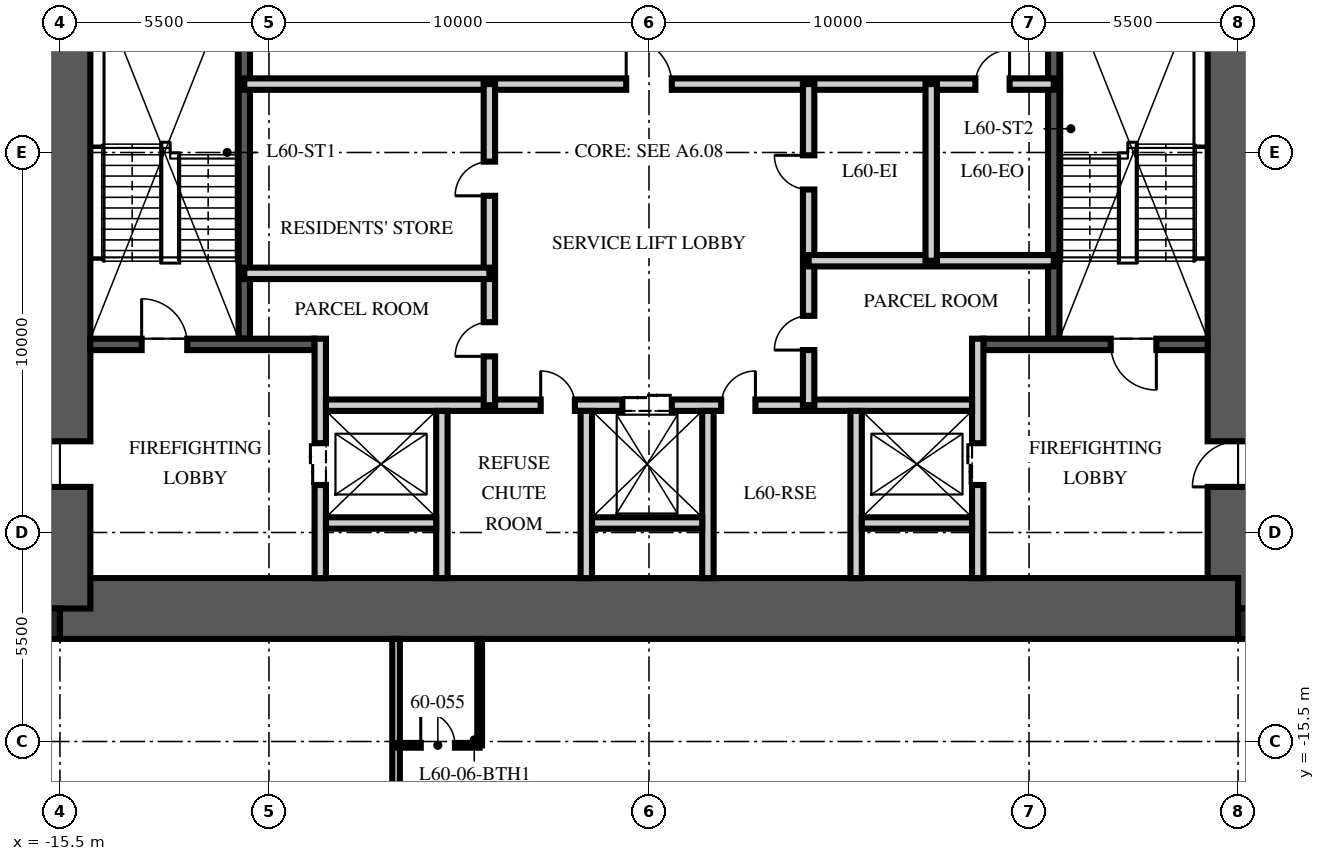
"""IFC4 building model, lengths in metres.
Left out: names, types, materials, properties, quantities, classifications, styles, units other than length and angle.
Written with IfcOpenShell. Run it as: python <this file> out.ifc"""

import sys

from ifc_helpers import new_model, si_unit, direction, frame, frame_2d, origin, origin_2d, place, context, subcontext, project, spatial, rectangle, extrude, element, fill, save


model = new_model("IFC4")
c1 = context("Model", 3, precision=1e-05, world=origin(), true_north=direction((0.0, 1.0)))
c2 = subcontext(c1, "Body", "Model", "MODEL_VIEW")
j1 = project(units=[si_unit("LENGTHUNIT", "METRE"), si_unit("PLANEANGLEUNIT", "RADIAN")], contexts=[c1])
p1 = place(None, origin())
s1 = spatial("IfcSite", under=j1, at=p1, CompositionType="ELEMENT")
p2 = place(p1, origin())
s2 = spatial("IfcBuilding", under=s1, at=p2, CompositionType="ELEMENT")
p3 = place(p2, frame((0.0, 0.0, 240.75)))
s3 = spatial("IfcBuildingStorey", under=s2, at=p3, CompositionType="ELEMENT", Elevation=240.75)
p4 = place(p3, frame((15.5, -12.0, -0.25), z_axis=(0.0, 0.0, 1.0), x_axis=(0.0, 1.0, 0.0)))
e1 = element("IfcWall", 1, at=p4, inside=s3, PredefinedType="SHEAR", context=c2, shape_type="SweptSolid", body=[
    extrude(rectangle(XDim=24.0, YDim=1.6, at=frame_2d((12.0, 0.0))), origin(), (0.0, 0.0, 1.0), 3.75),
])
p5 = place(p4, frame((3.2, 0.0, 0.25)))
e2 = element("IfcOpeningElement", 2, at=p5, cuts=e1, PredefinedType="OPENING", context=c2, shape_type="SweptSolid", body=[
    extrude(rectangle(XDim=1.2, YDim=2.1, at=frame_2d((0.6, 1.05))), frame((0.0, 0.81, 0.0), z_axis=(0.0, -1.0, 0.0), x_axis=(1.0, 0.0, 0.0)), (0.0, 0.0, 1.0), 1.62),
])
p6 = place(p4, frame((19.3, 0.0, 0.25)))
e3 = element("IfcOpeningElement", 3, at=p6, cuts=e1, PredefinedType="OPENING", context=c2, shape_type="SweptSolid", body=[
    extrude(rectangle(XDim=1.8, YDim=2.1, at=frame_2d((0.9, 1.05))), frame((0.0, 0.81, 0.0), z_axis=(0.0, -1.0, 0.0), x_axis=(1.0, 0.0, 0.0)), (0.0, 0.0, 1.0), 1.62),
])
p7 = place(p3, frame((-15.5, -12.0, -0.25), z_axis=(0.0, 0.0, 1.0), x_axis=(1.0, 0.0, 0.0)))
e4 = element("IfcWall", 4, at=p7, inside=s3, PredefinedType="SHEAR", context=c2, shape_type="SweptSolid", body=[
    extrude(rectangle(XDim=31.0, YDim=1.6, at=frame_2d((15.5, 0.0))), origin(), (0.0, 0.0, 1.0), 3.75),
])
p8 = place(p3, frame((-15.5, -12.0, -0.25), z_axis=(0.0, 0.0, 1.0), x_axis=(0.0, 1.0, 0.0)))
e5 = element("IfcWall", 5, at=p8, inside=s3, PredefinedType="SHEAR", context=c2, shape_type="SweptSolid", body=[
    extrude(rectangle(XDim=24.0, YDim=1.6, at=frame_2d((12.0, 0.0))), origin(), (0.0, 0.0, 1.0), 3.75),
])
p9 = place(p8, frame((3.2, 0.0, 0.25)))
e6 = element("IfcOpeningElement", 6, at=p9, cuts=e5, PredefinedType="OPENING", context=c2, shape_type="SweptSolid", body=[
    extrude(rectangle(XDim=1.2, YDim=2.1, at=frame_2d((0.6, 1.05))), frame((0.0, 0.81, 0.0), z_axis=(0.0, -1.0, 0.0), x_axis=(1.0, 0.0, 0.0)), (0.0, 0.0, 1.0), 1.62),
])
p10 = place(p8, frame((19.3, 0.0, 0.25)))
e7 = element("IfcOpeningElement", 7, at=p10, cuts=e5, PredefinedType="OPENING", context=c2, shape_type="SweptSolid", body=[
    extrude(rectangle(XDim=1.8, YDim=2.1, at=frame_2d((0.9, 1.05))), frame((0.0, 0.81, 0.0), z_axis=(0.0, -1.0, 0.0), x_axis=(1.0, 0.0, 0.0)), (0.0, 0.0, 1.0), 1.62),
])
for number, where, z_axis, x_axis in (
    (8, (-15.9, -12.4, -0.25), (0.0, 0.0, 1.0), (1.0, 0.0, 0.0)),
    (9, (15.9, -12.4, -0.25), (0.0, 0.0, 1.0), (1.0, 0.0, 0.0)),
):
    element("IfcColumn", number, at=place(p3, frame(where, z_axis=z_axis, x_axis=x_axis)), inside=s3, PredefinedType="COLUMN", context=c2, shape_type="SweptSolid", body=[
        extrude(rectangle(XDim=0.8, YDim=0.8, at=origin_2d()), origin(), (0.0, 0.0, 1.0), 3.75),
    ])
p11 = place(p3, frame((-10.65, -4.9, 0.0), z_axis=(0.0, 0.0, 1.0), x_axis=(0.0, 1.0, 0.0)))
e10 = element("IfcWall", 10, at=p11, inside=s3, PredefinedType="SOLIDWALL", context=c2, shape_type="SweptSolid", body=[
    extrude(rectangle(XDim=10.1, YDim=0.3, at=frame_2d((5.05, 0.0))), origin(), (0.0, 0.0, 1.0), 3.5),
])
p12 = place(p3, frame((-14.7, -5.05, 0.0), z_axis=(0.0, 0.0, 1.0), x_axis=(1.0, 0.0, 0.0)))
e11 = element("IfcWall", 11, at=p12, inside=s3, PredefinedType="SOLIDWALL", context=c2, shape_type="SweptSolid", body=[
    extrude(rectangle(XDim=5.9, YDim=0.3, at=frame_2d((2.95, 0.0))), origin(), (0.0, 0.0, 1.0), 3.5),
])
p13 = place(p12, frame((1.35, 0.0, 0.0)))
e12 = element("IfcOpeningElement", 12, at=p13, cuts=e11, PredefinedType="OPENING", context=c2, shape_type="SweptSolid", body=[
    extrude(rectangle(XDim=1.2, YDim=2.1, at=frame_2d((0.6, 1.05))), frame((0.0, 0.16, 0.0), z_axis=(0.0, -1.0, 0.0), x_axis=(1.0, 0.0, 0.0)), (0.0, 0.0, 1.0), 0.32),
])
p14 = place(p3, frame((-8.65, -11.2, 0.0), z_axis=(0.0, 0.0, 1.0), x_axis=(0.0, 1.0, 0.0)))
e13 = element("IfcWall", 13, at=p14, inside=s3, PredefinedType="PARTITIONING", context=c2, shape_type="SweptSolid", body=[
    extrude(rectangle(XDim=6.3, YDim=0.3, at=frame_2d((3.15, 0.0))), origin(), (0.0, 0.0, 1.0), 3.5),
])
p15 = place(p14, frame((2.45, 0.0, 0.0)))
e14 = element("IfcOpeningElement", 14, at=p15, cuts=e13, PredefinedType="OPENING", context=c2, shape_type="SweptSolid", body=[
    extrude(rectangle(XDim=1.1, YDim=2.1, at=frame_2d((0.55, 1.05))), frame((0.0, 0.16, 0.0), z_axis=(0.0, -1.0, 0.0), x_axis=(1.0, 0.0, 0.0)), (0.0, 0.0, 1.0), 0.32),
])
p16 = place(p3, frame((10.65, -4.9, 0.0), z_axis=(0.0, 0.0, 1.0), x_axis=(0.0, 1.0, 0.0)))
e15 = element("IfcWall", 15, at=p16, inside=s3, PredefinedType="SOLIDWALL", context=c2, shape_type="SweptSolid", body=[
    extrude(rectangle(XDim=10.1, YDim=0.3, at=frame_2d((5.05, 0.0))), origin(), (0.0, 0.0, 1.0), 3.5),
])
p17 = place(p3, frame((14.7, -5.05, 0.0), z_axis=(0.0, 0.0, 1.0), x_axis=(-1.0, 0.0, 0.0)))
e16 = element("IfcWall", 16, at=p17, inside=s3, PredefinedType="SOLIDWALL", context=c2, shape_type="SweptSolid", body=[
    extrude(rectangle(XDim=5.9, YDim=0.3, at=frame_2d((2.95, 0.0))), origin(), (0.0, 0.0, 1.0), 3.5),
])
p18 = place(p17, frame((1.35, 0.0, 0.0)))
e17 = element("IfcOpeningElement", 17, at=p18, cuts=e16, PredefinedType="OPENING", context=c2, shape_type="SweptSolid", body=[
    extrude(rectangle(XDim=1.2, YDim=2.1, at=frame_2d((0.6, 1.05))), frame((0.0, 0.16, 0.0), z_axis=(0.0, -1.0, 0.0), x_axis=(1.0, 0.0, 0.0)), (0.0, 0.0, 1.0), 0.32),
])
p19 = place(p3, frame((8.65, -11.2, 0.0), z_axis=(0.0, 0.0, 1.0), x_axis=(0.0, 1.0, 0.0)))
e18 = element("IfcWall", 18, at=p19, inside=s3, PredefinedType="PARTITIONING", context=c2, shape_type="SweptSolid", body=[
    extrude(rectangle(XDim=6.3, YDim=0.3, at=frame_2d((3.15, 0.0))), origin(), (0.0, 0.0, 1.0), 3.5),
])
p20 = place(p19, frame((2.45, 0.0, 0.0)))
e19 = element("IfcOpeningElement", 19, at=p20, cuts=e18, PredefinedType="OPENING", context=c2, shape_type="SweptSolid", body=[
    extrude(rectangle(XDim=1.1, YDim=2.1, at=frame_2d((0.55, 1.05))), frame((0.0, 0.16, 0.0), z_axis=(0.0, -1.0, 0.0), x_axis=(1.0, 0.0, 0.0)), (0.0, 0.0, 1.0), 0.32),
])
p21 = place(p3, frame((-8.5, -6.65, 0.0), z_axis=(0.0, 0.0, 1.0), x_axis=(1.0, 0.0, 0.0)))
e20 = element("IfcWall", 20, at=p21, inside=s3, PredefinedType="PARTITIONING", context=c2, shape_type="SweptSolid", body=[
    extrude(rectangle(XDim=17.0, YDim=0.3, at=frame_2d((8.5, 0.0))), origin(), (0.0, 0.0, 1.0), 3.5),
])
p22 = place(p21, frame((7.8, 0.0, 0.0)))
e21 = element("IfcOpeningElement", 21, at=p22, cuts=e20, PredefinedType="OPENING", context=c2, shape_type="SweptSolid", body=[
    extrude(rectangle(XDim=1.3, YDim=2.4, at=frame_2d((0.65, 1.2))), frame((0.0, 0.16, 0.0), z_axis=(0.0, -1.0, 0.0), x_axis=(1.0, 0.0, 0.0)), (0.0, 0.0, 1.0), 0.32),
])
p23 = place(p21, frame((5.65, 0.0, 0.0)))
e22 = element("IfcOpeningElement", 22, at=p23, cuts=e20, PredefinedType="OPENING", context=c2, shape_type="SweptSolid", body=[
    extrude(rectangle(XDim=0.9, YDim=2.1, at=frame_2d((0.45, 1.05))), frame((0.0, 0.16, 0.0), z_axis=(0.0, -1.0, 0.0), x_axis=(1.0, 0.0, 0.0)), (0.0, 0.0, 1.0), 0.32),
])
p24 = place(p21, frame((10.4, 0.0, 0.0)))
e23 = element("IfcOpeningElement", 23, at=p24, cuts=e20, PredefinedType="OPENING", context=c2, shape_type="SweptSolid", body=[
    extrude(rectangle(XDim=0.9, YDim=2.1, at=frame_2d((0.45, 1.05))), frame((0.0, 0.16, 0.0), z_axis=(0.0, -1.0, 0.0), x_axis=(1.0, 0.0, 0.0)), (0.0, 0.0, 1.0), 0.32),
])
for number, where, z_axis, x_axis in (
    (24, (-5.45, -11.2, 0.0), (0.0, 0.0, 1.0), (0.0, 1.0, 0.0)),
    (25, (-1.65, -11.2, 0.0), (0.0, 0.0, 1.0), (0.0, 1.0, 0.0)),
    (26, (1.55, -11.2, 0.0), (0.0, 0.0, 1.0), (0.0, 1.0, 0.0)),
    (27, (5.45, -11.2, 0.0), (0.0, 0.0, 1.0), (0.0, 1.0, 0.0)),
):
    element("IfcWall", number, at=place(p3, frame(where, z_axis=z_axis, x_axis=x_axis)), inside=s3, PredefinedType="PARTITIONING", context=c2, shape_type="SweptSolid", body=[
        extrude(rectangle(XDim=4.4, YDim=0.3, at=frame_2d((2.2, 0.0))), origin(), (0.0, 0.0, 1.0), 3.5),
    ])
for number, where, z_axis, x_axis in (
    (28, (-8.5, -9.75, 0.0), (0.0, 0.0, 1.0), (1.0, 0.0, 0.0)),
    (29, (-1.5, -9.75, 0.0), (0.0, 0.0, 1.0), (1.0, 0.0, 0.0)),
    (30, (5.6, -9.75, 0.0), (0.0, 0.0, 1.0), (1.0, 0.0, 0.0)),
):
    element("IfcWall", number, at=place(p3, frame(where, z_axis=z_axis, x_axis=x_axis)), inside=s3, PredefinedType="PARTITIONING", context=c2, shape_type="SweptSolid", body=[
        extrude(rectangle(XDim=2.9, YDim=0.3, at=frame_2d((1.45, 0.0))), origin(), (0.0, 0.0, 1.0), 3.5),
    ])
p25 = place(p3, frame((-10.65, 1.8, 0.0), z_axis=(0.0, 0.0, 1.0), x_axis=(1.0, 0.0, 0.0)))
e31 = element("IfcWall", 31, at=p25, inside=s3, PredefinedType="PARTITIONING", context=c2, shape_type="SweptSolid", body=[
    extrude(rectangle(XDim=21.3, YDim=0.3, at=frame_2d((10.65, 0.0))), origin(), (0.0, 0.0, 1.0), 3.5),
])
p26 = place(p25, frame((10.05, 0.0, 0.0)))
e32 = element("IfcOpeningElement", 32, at=p26, cuts=e31, PredefinedType="OPENING", context=c2, shape_type="SweptSolid", body=[
    extrude(rectangle(XDim=1.2, YDim=2.1, at=frame_2d((0.6, 1.05))), frame((0.0, 0.16, 0.0), z_axis=(0.0, -1.0, 0.0), x_axis=(1.0, 0.0, 0.0)), (0.0, 0.0, 1.0), 0.32),
])
p27 = place(p25, frame((19.238, 0.0, 0.0)))
e33 = element("IfcOpeningElement", 33, at=p27, cuts=e31, PredefinedType="OPENING", context=c2, shape_type="SweptSolid", body=[
    extrude(rectangle(XDim=0.9, YDim=2.1, at=frame_2d((0.45, 1.05))), frame((0.0, 0.16, 0.0), z_axis=(0.0, -1.0, 0.0), x_axis=(1.0, 0.0, 0.0)), (0.0, 0.0, 1.0), 0.32),
])
p28 = place(p3, frame((-4.2, -6.65, 0.0), z_axis=(0.0, 0.0, 1.0), x_axis=(0.0, 1.0, 0.0)))
e34 = element("IfcWall", 34, at=p28, inside=s3, PredefinedType="PARTITIONING", context=c2, shape_type="SweptSolid", body=[
    extrude(rectangle(XDim=8.45, YDim=0.3, at=frame_2d((4.225, 0.0))), origin(), (0.0, 0.0, 1.0), 3.5),
])
p29 = place(p28, frame((1.285, 0.0, 0.0)))
e35 = element("IfcOpeningElement", 35, at=p29, cuts=e34, PredefinedType="OPENING", context=c2, shape_type="SweptSolid", body=[
    extrude(rectangle(XDim=0.9, YDim=2.1, at=frame_2d((0.45, 1.05))), frame((0.0, 0.16, 0.0), z_axis=(0.0, -1.0, 0.0), x_axis=(1.0, 0.0, 0.0)), (0.0, 0.0, 1.0), 0.32),
])
p30 = place(p28, frame((5.51, 0.0, 0.0)))
e36 = element("IfcOpeningElement", 36, at=p30, cuts=e34, PredefinedType="OPENING", context=c2, shape_type="SweptSolid", body=[
    extrude(rectangle(XDim=0.9, YDim=2.1, at=frame_2d((0.45, 1.05))), frame((0.0, 0.16, 0.0), z_axis=(0.0, -1.0, 0.0), x_axis=(1.0, 0.0, 0.0)), (0.0, 0.0, 1.0), 0.32),
])
p31 = place(p3, frame((4.2, -6.65, 0.0), z_axis=(0.0, 0.0, 1.0), x_axis=(0.0, 1.0, 0.0)))
e37 = element("IfcWall", 37, at=p31, inside=s3, PredefinedType="PARTITIONING", context=c2, shape_type="SweptSolid", body=[
    extrude(rectangle(XDim=8.45, YDim=0.3, at=frame_2d((4.225, 0.0))), origin(), (0.0, 0.0, 1.0), 3.5),
])
p32 = place(p31, frame((1.451, 0.0, 0.0)))
e38 = element("IfcOpeningElement", 38, at=p32, cuts=e37, PredefinedType="OPENING", context=c2, shape_type="SweptSolid", body=[
    extrude(rectangle(XDim=0.9, YDim=2.1, at=frame_2d((0.45, 1.05))), frame((0.0, 0.16, 0.0), z_axis=(0.0, -1.0, 0.0), x_axis=(1.0, 0.0, 0.0)), (0.0, 0.0, 1.0), 0.32),
])
p33 = place(p31, frame((5.676, 0.0, 0.0)))
e39 = element("IfcOpeningElement", 39, at=p33, cuts=e37, PredefinedType="OPENING", context=c2, shape_type="SweptSolid", body=[
    extrude(rectangle(XDim=0.9, YDim=2.1, at=frame_2d((0.45, 1.05))), frame((0.0, 0.16, 0.0), z_axis=(0.0, -1.0, 0.0), x_axis=(1.0, 0.0, 0.0)), (0.0, 0.0, 1.0), 0.32),
])
for number, where, z_axis, x_axis in (
    (40, (-10.65, -3.18, 0.0), (0.0, 0.0, 1.0), (1.0, 0.0, 0.0)),
    (41, (10.65, -2.848, 0.0), (0.0, 0.0, 1.0), (-1.0, 0.0, 0.0)),
):
    element("IfcWall", number, at=place(p3, frame(where, z_axis=z_axis, x_axis=x_axis)), inside=s3, PredefinedType="PARTITIONING", context=c2, shape_type="SweptSolid", body=[
        extrude(rectangle(XDim=6.45, YDim=0.3, at=frame_2d((3.225, 0.0))), origin(), (0.0, 0.0, 1.0), 3.5),
    ])
p34 = place(p3, frame((7.425, -2.848, 0.0), z_axis=(0.0, 0.0, 1.0), x_axis=(0.0, 1.0, 0.0)))
e42 = element("IfcWall", 42, at=p34, inside=s3, PredefinedType="PARTITIONING", context=c2, shape_type="SweptSolid", body=[
    extrude(rectangle(XDim=4.648, YDim=0.3, at=frame_2d((2.324, 0.0))), origin(), (0.0, 0.0, 1.0), 3.5),
])
p35 = place(p3, frame((-6.656, -12.8, 0.0), z_axis=(0.0, 0.0, 1.0), x_axis=(0.0, -1.0, 0.0)))
e43 = element("IfcWall", 43, at=p35, inside=s3, PredefinedType="PARTITIONING", context=c2, shape_type="SweptSolid", body=[
    extrude(rectangle(XDim=13.15, YDim=0.2, at=frame_2d((6.575, 0.0))), origin(), (0.0, 0.0, 1.0), 2.91),
])
p36 = place(p3, frame((-6.656, -15.6, 0.0), z_axis=(0.0, 0.0, 1.0), x_axis=(1.0, 0.0, 0.0)))
e44 = element("IfcWall", 44, at=p36, inside=s3, PredefinedType="PARTITIONING", context=c2, shape_type="SweptSolid", body=[
    extrude(rectangle(XDim=2.2, YDim=0.125, at=frame_2d((1.1, 0.0))), origin(), (0.0, 0.0, 1.0), 3.5),
])
p37 = place(p36, frame((0.65, 0.0, 0.0)))
e45 = element("IfcOpeningElement", 45, at=p37, cuts=e44, PredefinedType="OPENING", context=c2, shape_type="SweptSolid", body=[
    extrude(rectangle(XDim=0.9, YDim=2.1, at=frame_2d((0.45, 1.05))), frame((0.0, 0.073, 0.0), z_axis=(0.0, -1.0, 0.0), x_axis=(1.0, 0.0, 0.0)), (0.0, 0.0, 1.0), 0.145),
])
p38 = place(p3, frame((-4.456, -12.8, 0.0), z_axis=(0.0, 0.0, 1.0), x_axis=(0.0, -1.0, 0.0)))
e46 = element("IfcWall", 46, at=p38, inside=s3, PredefinedType="PARTITIONING", context=c2, shape_type="SweptSolid", body=[
    extrude(rectangle(XDim=2.8, YDim=0.125, at=frame_2d((1.4, 0.0))), origin(), (0.0, 0.0, 1.0), 3.5),
])
p39 = place(p13, origin())
e47 = element("IfcDoor", 47, at=p39, inside=s3, OperationType="SINGLE_SWING_LEFT", PredefinedType="DOOR", context=c2, shape_type="SweptSolid", body=[
    extrude(rectangle(XDim=1.2, YDim=2.1, at=frame_2d((0.6, 1.05))), frame((0.0, 0.025, 0.0), z_axis=(0.0, -1.0, 0.0), x_axis=(1.0, 0.0, 0.0)), (0.0, 0.0, 1.0), 0.05),
])
fill(e12, e47)
p40 = place(p9, origin())
e48 = element("IfcDoor", 48, at=p40, inside=s3, OperationType="SINGLE_SWING_LEFT", PredefinedType="DOOR", context=c2, shape_type="SweptSolid", body=[
    extrude(rectangle(XDim=1.2, YDim=2.1, at=frame_2d((0.6, 1.05))), frame((0.0, 0.025, 0.0), z_axis=(0.0, -1.0, 0.0), x_axis=(1.0, 0.0, 0.0)), (0.0, 0.0, 1.0), 0.05),
])
fill(e6, e48)
p41 = place(p18, origin())
e49 = element("IfcDoor", 49, at=p41, inside=s3, OperationType="SINGLE_SWING_LEFT", PredefinedType="DOOR", context=c2, shape_type="SweptSolid", body=[
    extrude(rectangle(XDim=1.2, YDim=2.1, at=frame_2d((0.6, 1.05))), frame((0.0, 0.025, 0.0), z_axis=(0.0, -1.0, 0.0), x_axis=(1.0, 0.0, 0.0)), (0.0, 0.0, 1.0), 0.05),
])
fill(e17, e49)
p42 = place(p5, origin())
e50 = element("IfcDoor", 50, at=p42, inside=s3, OperationType="SINGLE_SWING_LEFT", PredefinedType="DOOR", context=c2, shape_type="SweptSolid", body=[
    extrude(rectangle(XDim=1.2, YDim=2.1, at=frame_2d((0.6, 1.05))), frame((0.0, 0.025, 0.0), z_axis=(0.0, -1.0, 0.0), x_axis=(1.0, 0.0, 0.0)), (0.0, 0.0, 1.0), 0.05),
])
fill(e2, e50)
p43 = place(p15, origin())
e51 = element("IfcDoor", 51, at=p43, inside=s3, OperationType="DOUBLE_DOOR_SLIDING", PredefinedType="DOOR", context=c2, shape_type="SweptSolid", body=[
    extrude(rectangle(XDim=1.1, YDim=2.1, at=frame_2d((0.55, 1.05))), frame((0.0, 0.025, 0.0), z_axis=(0.0, -1.0, 0.0), x_axis=(1.0, 0.0, 0.0)), (0.0, 0.0, 1.0), 0.05),
])
fill(e14, e51)
p44 = place(p20, origin())
e52 = element("IfcDoor", 52, at=p44, inside=s3, OperationType="DOUBLE_DOOR_SLIDING", PredefinedType="DOOR", context=c2, shape_type="SweptSolid", body=[
    extrude(rectangle(XDim=1.1, YDim=2.1, at=frame_2d((0.55, 1.05))), frame((0.0, 0.025, 0.0), z_axis=(0.0, -1.0, 0.0), x_axis=(1.0, 0.0, 0.0)), (0.0, 0.0, 1.0), 0.05),
])
fill(e19, e52)
p45 = place(p22, origin())
e53 = element("IfcDoor", 53, at=p45, inside=s3, OperationType="DOUBLE_DOOR_SLIDING", PredefinedType="DOOR", context=c2, shape_type="SweptSolid", body=[
    extrude(rectangle(XDim=1.3, YDim=2.4, at=frame_2d((0.65, 1.2))), frame((0.0, 0.025, 0.0), z_axis=(0.0, -1.0, 0.0), x_axis=(1.0, 0.0, 0.0)), (0.0, 0.0, 1.0), 0.05),
])
fill(e21, e53)
p46 = place(p26, origin())
e54 = element("IfcDoor", 54, at=p46, inside=s3, OperationType="SINGLE_SWING_LEFT", PredefinedType="DOOR", context=c2, shape_type="SweptSolid", body=[
    extrude(rectangle(XDim=1.2, YDim=2.1, at=frame_2d((0.6, 1.05))), frame((0.0, 0.025, 0.0), z_axis=(0.0, -1.0, 0.0), x_axis=(1.0, 0.0, 0.0)), (0.0, 0.0, 1.0), 0.05),
])
fill(e32, e54)
p47 = place(p23, origin())
e55 = element("IfcDoor", 55, at=p47, inside=s3, OperationType="SINGLE_SWING_LEFT", PredefinedType="DOOR", context=c2, shape_type="SweptSolid", body=[
    extrude(rectangle(XDim=0.9, YDim=2.1, at=frame_2d((0.45, 1.05))), frame((0.0, 0.025, 0.0), z_axis=(0.0, -1.0, 0.0), x_axis=(1.0, 0.0, 0.0)), (0.0, 0.0, 1.0), 0.05),
])
fill(e22, e55)
p48 = place(p24, origin())
e56 = element("IfcDoor", 56, at=p48, inside=s3, OperationType="SINGLE_SWING_RIGHT", PredefinedType="DOOR", context=c2, shape_type="SweptSolid", body=[
    extrude(rectangle(XDim=0.9, YDim=2.1, at=frame_2d((0.45, 1.05))), frame((0.0, 0.025, 0.0), z_axis=(0.0, -1.0, 0.0), x_axis=(1.0, 0.0, 0.0)), (0.0, 0.0, 1.0), 0.05),
])
fill(e23, e56)
p49 = place(p29, origin())
e57 = element("IfcDoor", 57, at=p49, inside=s3, OperationType="SINGLE_SWING_LEFT", PredefinedType="DOOR", context=c2, shape_type="SweptSolid", body=[
    extrude(rectangle(XDim=0.9, YDim=2.1, at=frame_2d((0.45, 1.05))), frame((0.0, 0.025, 0.0), z_axis=(0.0, -1.0, 0.0), x_axis=(1.0, 0.0, 0.0)), (0.0, 0.0, 1.0), 0.05),
])
fill(e35, e57)
p50 = place(p30, origin())
e58 = element("IfcDoor", 58, at=p50, inside=s3, OperationType="SINGLE_SWING_LEFT", PredefinedType="DOOR", context=c2, shape_type="SweptSolid", body=[
    extrude(rectangle(XDim=0.9, YDim=2.1, at=frame_2d((0.45, 1.05))), frame((0.0, 0.025, 0.0), z_axis=(0.0, -1.0, 0.0), x_axis=(1.0, 0.0, 0.0)), (0.0, 0.0, 1.0), 0.05),
])
fill(e36, e58)
p51 = place(p32, origin())
e59 = element("IfcDoor", 59, at=p51, inside=s3, OperationType="SINGLE_SWING_LEFT", PredefinedType="DOOR", context=c2, shape_type="SweptSolid", body=[
    extrude(rectangle(XDim=0.9, YDim=2.1, at=frame_2d((0.45, 1.05))), frame((0.0, 0.025, 0.0), z_axis=(0.0, -1.0, 0.0), x_axis=(1.0, 0.0, 0.0)), (0.0, 0.0, 1.0), 0.05),
])
fill(e38, e59)
p52 = place(p33, origin())
e60 = element("IfcDoor", 60, at=p52, inside=s3, OperationType="SINGLE_SWING_RIGHT", PredefinedType="DOOR", context=c2, shape_type="SweptSolid", body=[
    extrude(rectangle(XDim=0.9, YDim=2.1, at=frame_2d((0.45, 1.05))), frame((0.0, 0.025, 0.0), z_axis=(0.0, -1.0, 0.0), x_axis=(1.0, 0.0, 0.0)), (0.0, 0.0, 1.0), 0.05),
])
fill(e39, e60)
p53 = place(p27, origin())
e61 = element("IfcDoor", 61, at=p53, inside=s3, OperationType="SINGLE_SWING_RIGHT", PredefinedType="DOOR", context=c2, shape_type="SweptSolid", body=[
    extrude(rectangle(XDim=0.9, YDim=2.1, at=frame_2d((0.45, 1.05))), frame((0.0, 0.025, 0.0), z_axis=(0.0, -1.0, 0.0), x_axis=(1.0, 0.0, 0.0)), (0.0, 0.0, 1.0), 0.05),
])
fill(e33, e61)
p54 = place(p37, origin())
e62 = element("IfcDoor", 62, at=p54, inside=s3, OperationType="SINGLE_SWING_LEFT", PredefinedType="DOOR", context=c2, shape_type="SweptSolid", body=[
    extrude(rectangle(XDim=0.9, YDim=2.1, at=frame_2d((0.45, 1.05))), frame((0.0, 0.025, 0.0), z_axis=(0.0, -1.0, 0.0), x_axis=(1.0, 0.0, 0.0)), (0.0, 0.0, 1.0), 0.05),
])
fill(e45, e62)
save(model, sys.argv[1])
